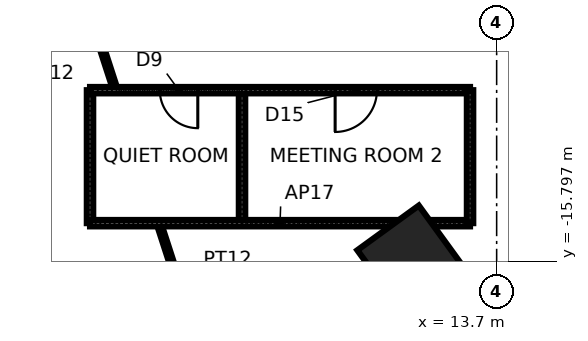
"""IFC4 building model, lengths in metres.
Left out: names, types, materials, properties, quantities, classifications, styles, units other than length and angle.
Written with IfcOpenShell. Run it as: python <this file> out.ifc"""

import sys

from ifc_helpers import new_model, si_unit, direction, frame, frame_2d, origin, origin_2d, place, context, subcontext, project, spatial, rectangle, extrude, element, fill, save


model = new_model("IFC4")
c1 = context("Model", 3, precision=1e-05, world=origin(), true_north=direction((0.0, 1.0)))
c2 = subcontext(c1, "Body", "Model", "MODEL_VIEW")
j1 = project(units=[si_unit("LENGTHUNIT", "METRE"), si_unit("PLANEANGLEUNIT", "RADIAN")], contexts=[c1])
p1 = place(None, origin())
s1 = spatial("IfcSite", under=j1, at=p1, CompositionType="ELEMENT")
p2 = place(p1, origin())
s2 = spatial("IfcBuilding", under=s1, at=p2, CompositionType="ELEMENT")
p3 = place(p2, frame((0.0, 0.0, 23.8)))
s3 = spatial("IfcBuildingStorey", under=s2, at=p3, CompositionType="ELEMENT", Elevation=23.8)
p4 = place(p3, frame((11.43, -15.733, 0.0), z_axis=(0.0, 0.0, 1.0), x_axis=(0.587785252292, -0.809016994375, 0.0)))
e1 = element("IfcColumn", 1, at=p4, inside=s3, PredefinedType="COLUMN", context=c2, shape_type="SweptSolid", body=[
    extrude(rectangle(XDim=2.0, YDim=2.0, at=origin_2d()), origin(), (0.0, 0.0, 1.0), 4.2),
])
p5 = place(p3, frame((3.0, -11.3, 0.0), z_axis=(0.0, 0.0, 1.0), x_axis=(0.0, -1.0, 0.0)))
e2 = element("IfcWall", 2, at=p5, inside=s3, PredefinedType="PARTITIONING", context=c2, shape_type="SweptSolid", body=[
    extrude(rectangle(XDim=3.5, YDim=0.17, at=frame_2d((1.75, 0.0))), origin(), (0.0, 0.0, 1.0), 4.04),
])
p6 = place(p3, frame((3.672, -11.3, 0.0), z_axis=(0.0, 0.0, 1.0), x_axis=(-0.309059822154, 0.95104259964, 0.0)))
e3 = element("IfcWall", 3, at=p6, inside=s3, PredefinedType="PARTITIONING", context=c2, shape_type="SweptSolid", body=[
    extrude(rectangle(XDim=1.893, YDim=0.12, at=frame_2d((0.946, 0.0))), origin(), (0.0, 0.0, 1.0), 2.84),
])
p7 = place(p3, frame((7.33, -22.56, 0.0), z_axis=(0.0, 0.0, 1.0), x_axis=(-0.30900149873, 0.951061550996, 0.0)))
e4 = element("IfcWall", 4, at=p7, inside=s3, PredefinedType="PARTITIONING", context=c2, shape_type="SweptSolid", body=[
    extrude(rectangle(XDim=8.159, YDim=0.12, at=frame_2d((4.08, 0.0))), origin(), (0.0, 0.0, 1.0), 2.84),
])
p8 = place(p7, frame((2.603, 0.0, 0.0)))
e5 = element("IfcOpeningElement", 5, at=p8, cuts=e4, PredefinedType="OPENING", context=c2, shape_type="SweptSolid", body=[
    extrude(rectangle(XDim=1.0, YDim=2.4, at=frame_2d((0.5, 1.2))), frame((0.0, 0.07, 0.0), z_axis=(0.0, -1.0, 0.0), x_axis=(1.0, 0.0, 0.0)), (0.0, 0.0, 1.0), 0.14),
])
p9 = place(p3, frame((7.0, -11.3, 0.0), z_axis=(0.0, 0.0, 1.0), x_axis=(0.0, -1.0, 0.0)))
e6 = element("IfcWall", 6, at=p9, inside=s3, PredefinedType="PARTITIONING", context=c2, shape_type="SweptSolid", body=[
    extrude(rectangle(XDim=3.5, YDim=0.17, at=frame_2d((1.75, 0.0))), origin(), (0.0, 0.0, 1.0), 4.04),
])
p10 = place(p3, frame((3.0, -14.8, 0.0), z_axis=(0.0, 0.0, 1.0), x_axis=(1.0, 0.0, 0.0)))
e7 = element("IfcWall", 7, at=p10, inside=s3, PredefinedType="PARTITIONING", context=c2, shape_type="SweptSolid", body=[
    extrude(rectangle(XDim=10.0, YDim=0.17, at=frame_2d((5.0, 0.0))), origin(), (0.0, 0.0, 1.0), 4.04),
])
p11 = place(p3, frame((13.0, -11.3, 0.0), z_axis=(0.0, 0.0, 1.0), x_axis=(-1.0, 0.0, 0.0)))
e8 = element("IfcWall", 8, at=p11, inside=s3, PredefinedType="PARTITIONING", context=c2, shape_type="SweptSolid", body=[
    extrude(rectangle(XDim=10.0, YDim=0.17, at=frame_2d((5.0, 0.0))), origin(), (0.0, 0.0, 1.0), 4.04),
])
p12 = place(p11, frame((7.164, 0.0, 0.0)))
e9 = element("IfcOpeningElement", 9, at=p12, cuts=e8, PredefinedType="OPENING", context=c2, shape_type="SweptSolid", body=[
    extrude(rectangle(XDim=1.0, YDim=2.4, at=frame_2d((0.5, 1.2))), frame((0.0, 0.095, 0.0), z_axis=(0.0, -1.0, 0.0), x_axis=(1.0, 0.0, 0.0)), (0.0, 0.0, 1.0), 0.19),
])
p13 = place(p11, frame((2.45, 0.0, 0.0)))
e10 = element("IfcOpeningElement", 10, at=p13, cuts=e8, PredefinedType="OPENING", context=c2, shape_type="SweptSolid", body=[
    extrude(rectangle(XDim=1.1, YDim=2.4, at=frame_2d((0.55, 1.2))), frame((0.0, 0.095, 0.0), z_axis=(0.0, -1.0, 0.0), x_axis=(1.0, 0.0, 0.0)), (0.0, 0.0, 1.0), 0.19),
])
p14 = place(p3, frame((13.0, -14.8, 0.0), z_axis=(0.0, 0.0, 1.0), x_axis=(0.0, 1.0, 0.0)))
e11 = element("IfcWall", 11, at=p14, inside=s3, PredefinedType="PARTITIONING", context=c2, shape_type="SweptSolid", body=[
    extrude(rectangle(XDim=3.5, YDim=0.17, at=frame_2d((1.75, 0.0))), origin(), (0.0, 0.0, 1.0), 4.04),
])
p15 = place(p12, origin())
e12 = element("IfcDoor", 12, at=p15, inside=s3, OperationType="SINGLE_SWING_LEFT", PredefinedType="DOOR", context=c2, shape_type="SweptSolid", body=[
    extrude(rectangle(XDim=1.0, YDim=2.4, at=frame_2d((0.5, 1.2))), frame((0.0, 0.025, 0.0), z_axis=(0.0, -1.0, 0.0), x_axis=(1.0, 0.0, 0.0)), (0.0, 0.0, 1.0), 0.05),
])
fill(e9, e12)
p16 = place(p13, origin())
e13 = element("IfcDoor", 13, at=p16, inside=s3, OperationType="SINGLE_SWING_RIGHT", PredefinedType="DOOR", context=c2, shape_type="SweptSolid", body=[
    extrude(rectangle(XDim=1.1, YDim=2.4, at=frame_2d((0.55, 1.2))), frame((0.0, 0.025, 0.0), z_axis=(0.0, -1.0, 0.0), x_axis=(1.0, 0.0, 0.0)), (0.0, 0.0, 1.0), 0.05),
])
fill(e10, e13)
save(model, sys.argv[1])
